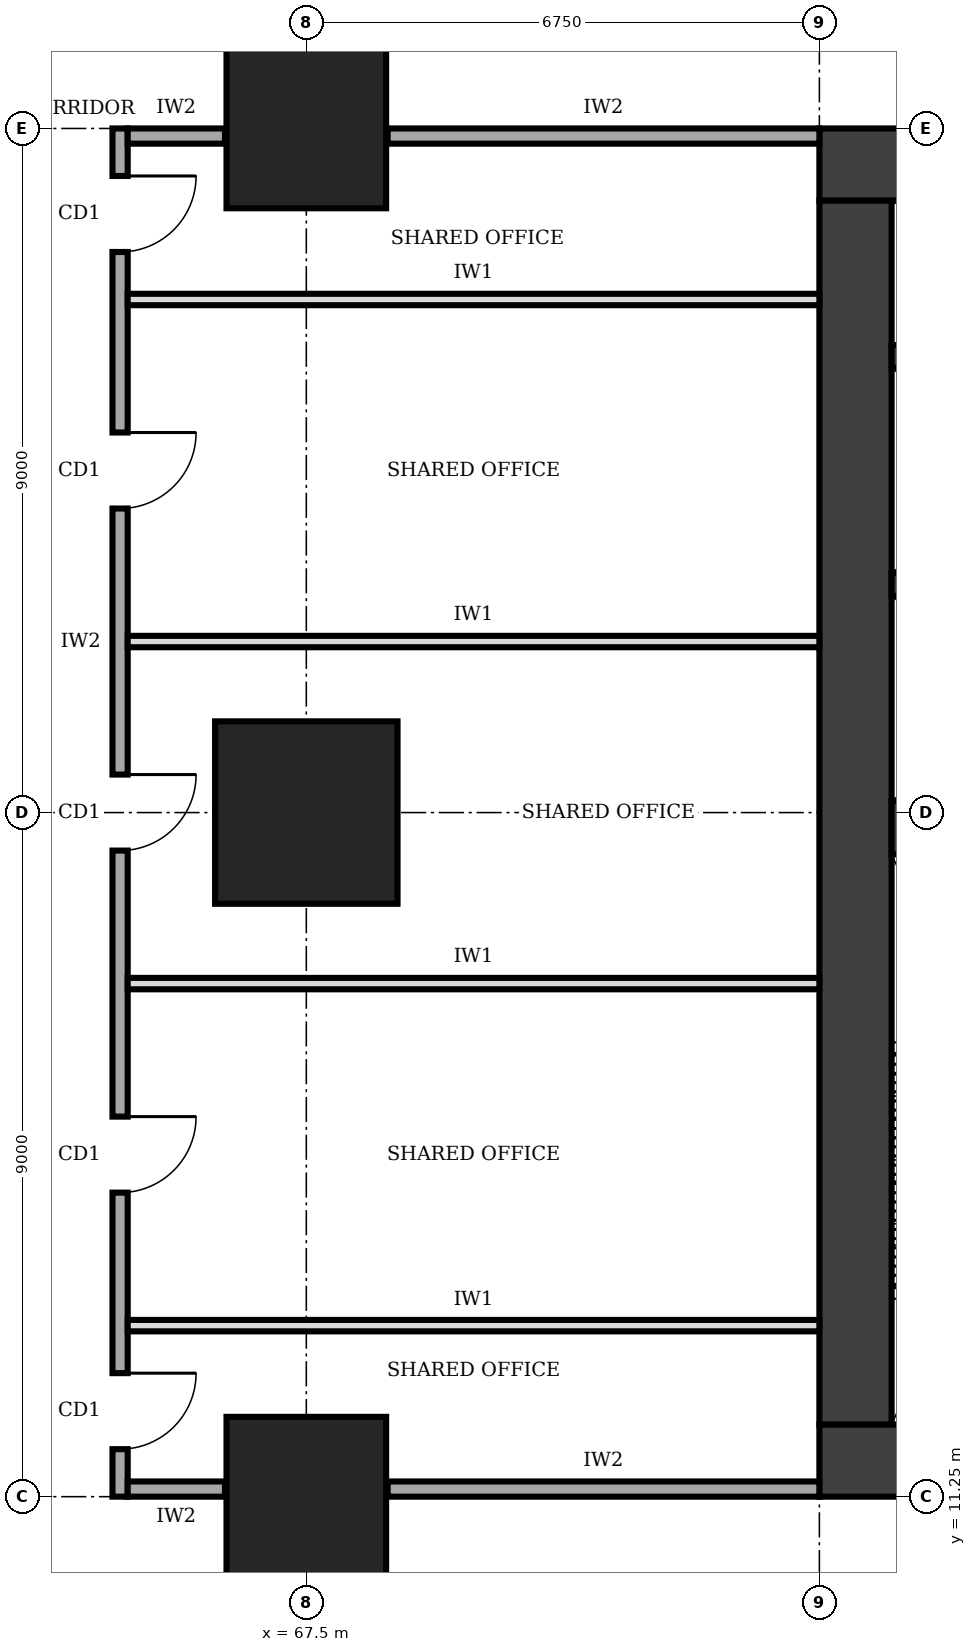
"""IFC4 building model, lengths in metres.
Left out: names, types, materials, properties, quantities, classifications, styles, units other than length and angle.
Written with IfcOpenShell. Run it as: python <this file> out.ifc"""

import sys

from ifc_helpers import new_model, si_unit, direction, frame, frame_2d, origin, origin_2d, place, context, subcontext, project, spatial, rectangle, extrude, element, fill, save


model = new_model("IFC4")
c1 = context("Model", 3, precision=1e-05, world=origin(), true_north=direction((0.0, 1.0)))
c2 = subcontext(c1, "Body", "Model", "MODEL_VIEW")
j1 = project(units=[si_unit("LENGTHUNIT", "METRE"), si_unit("PLANEANGLEUNIT", "RADIAN")], contexts=[c1])
p1 = place(None, origin())
s1 = spatial("IfcSite", under=j1, at=p1, CompositionType="ELEMENT")
p2 = place(p1, origin())
s2 = spatial("IfcBuilding", under=s1, at=p2, CompositionType="ELEMENT")
p3 = place(p2, frame((0.0, 0.0, 85.0)))
s3 = spatial("IfcBuildingStorey", under=s2, at=p3, CompositionType="ELEMENT", Elevation=85.0)
p4 = place(p3, frame((74.25, 11.725, 0.0), z_axis=(0.0, 0.0, 1.0), x_axis=(1.0, 0.0, 0.0)))
e1 = element("IfcWall", 1, at=p4, inside=s3, PredefinedType="SHEAR", context=c2, shape_type="SweptSolid", body=[
    extrude(rectangle(XDim=13.5, YDim=0.95, at=frame_2d((6.75, 0.0))), origin(), (0.0, 0.0, 1.0), 4.0),
])
p5 = place(p4, frame((4.75, 0.0, 0.0)))
e2 = element("IfcOpeningElement", 2, at=p5, cuts=e1, PredefinedType="OPENING", context=c2, shape_type="SweptSolid", body=[
    extrude(rectangle(XDim=1.0, YDim=2.1, at=frame_2d((0.5, 1.05))), frame((0.0, 0.485, 0.0), z_axis=(0.0, -1.0, 0.0), x_axis=(1.0, 0.0, 0.0)), (0.0, 0.0, 1.0), 0.97),
])
p6 = place(p3, frame((87.75, 28.775, 0.0), z_axis=(0.0, 0.0, 1.0), x_axis=(-1.0, 0.0, 0.0)))
e3 = element("IfcWall", 3, at=p6, inside=s3, PredefinedType="SHEAR", context=c2, shape_type="SweptSolid", body=[
    extrude(rectangle(XDim=13.5, YDim=0.95, at=frame_2d((6.75, 0.0))), origin(), (0.0, 0.0, 1.0), 4.0),
])
p7 = place(p6, frame((4.75, 0.0, 0.0)))
e4 = element("IfcOpeningElement", 4, at=p7, cuts=e3, PredefinedType="OPENING", context=c2, shape_type="SweptSolid", body=[
    extrude(rectangle(XDim=1.8, YDim=2.1, at=frame_2d((0.9, 1.05))), frame((0.0, 0.485, 0.0), z_axis=(0.0, -1.0, 0.0), x_axis=(1.0, 0.0, 0.0)), (0.0, 0.0, 1.0), 0.97),
])
p8 = place(p3, frame((74.725, 28.3, 0.0), z_axis=(0.0, 0.0, 1.0), x_axis=(0.0, -1.0, 0.0)))
e5 = element("IfcWall", 5, at=p8, inside=s3, PredefinedType="SHEAR", context=c2, shape_type="SweptSolid", body=[
    extrude(rectangle(XDim=16.1, YDim=0.95, at=frame_2d((8.05, 0.0))), origin(), (0.0, 0.0, 1.0), 4.0),
])
p9 = place(p3, frame((75.2, 20.05, 0.0), z_axis=(0.0, 0.0, 1.0), x_axis=(1.0, 0.0, 0.0)))
e6 = element("IfcWall", 6, at=p9, inside=s3, PredefinedType="SHEAR", context=c2, shape_type="SweptSolid", body=[
    extrude(rectangle(XDim=3.4, YDim=0.7, at=frame_2d((1.7, 0.0))), origin(), (0.0, 0.0, 1.0), 4.0),
])
for number, where, z_axis, x_axis in (
    (7, (75.2, 23.25, 0.0), (0.0, 0.0, 1.0), (1.0, 0.0, 0.0)),
    (8, (75.2, 26.25, 0.0), (0.0, 0.0, 1.0), (1.0, 0.0, 0.0)),
):
    element("IfcWall", number, at=place(p3, frame(where, z_axis=z_axis, x_axis=x_axis)), inside=s3, PredefinedType="SHEAR", context=c2, shape_type="SweptSolid", body=[
        extrude(rectangle(XDim=3.4, YDim=0.3, at=frame_2d((1.7, 0.0))), origin(), (0.0, 0.0, 1.0), 4.0),
    ])
p10 = place(p3, frame((67.5, 11.25, 0.0), z_axis=(0.0, 0.0, 1.0), x_axis=(1.0, 0.0, 0.0)))
e9 = element("IfcColumn", 9, at=p10, inside=s3, PredefinedType="COLUMN", context=c2, shape_type="SweptSolid", body=[
    extrude(rectangle(XDim=2.1, YDim=2.1, at=origin_2d()), origin(), (0.0, 0.0, 1.0), 4.0),
])
p11 = place(p3, frame((67.5, 20.25, 0.0), z_axis=(0.0, 0.0, 1.0), x_axis=(1.0, 0.0, 0.0)))
e10 = element("IfcColumn", 10, at=p11, inside=s3, PredefinedType="COLUMN", context=c2, shape_type="SweptSolid", body=[
    extrude(rectangle(XDim=2.4, YDim=2.4, at=origin_2d()), origin(), (0.0, 0.0, 1.0), 4.0),
])
p12 = place(p3, frame((67.5, 29.25, 0.0), z_axis=(0.0, 0.0, 1.0), x_axis=(1.0, 0.0, 0.0)))
e11 = element("IfcColumn", 11, at=p12, inside=s3, PredefinedType="COLUMN", context=c2, shape_type="SweptSolid", body=[
    extrude(rectangle(XDim=2.1, YDim=2.1, at=origin_2d()), origin(), (0.0, 0.0, 1.0), 4.0),
])
p13 = place(p3, frame((65.05, 29.25, 0.0), z_axis=(0.0, 0.0, 1.0), x_axis=(0.0, -1.0, 0.0)))
e12 = element("IfcWall", 12, at=p13, inside=s3, PredefinedType="SOLIDWALL", context=c2, shape_type="SweptSolid", body=[
    extrude(rectangle(XDim=18.0, YDim=0.2, at=frame_2d((9.0, 0.0))), origin(), (0.0, 0.0, 1.0), 3.75),
])
p14 = place(p13, frame((16.375, 0.0, 0.0)))
e13 = element("IfcOpeningElement", 13, at=p14, cuts=e12, PredefinedType="OPENING", context=c2, shape_type="SweptSolid", body=[
    extrude(rectangle(XDim=1.0, YDim=2.1, at=frame_2d((0.5, 1.05))), frame((0.0, 0.11, 0.0), z_axis=(0.0, -1.0, 0.0), x_axis=(1.0, 0.0, 0.0)), (0.0, 0.0, 1.0), 0.22),
])
p15 = place(p13, frame((13.0, 0.0, 0.0)))
e14 = element("IfcOpeningElement", 14, at=p15, cuts=e12, PredefinedType="OPENING", context=c2, shape_type="SweptSolid", body=[
    extrude(rectangle(XDim=1.0, YDim=2.1, at=frame_2d((0.5, 1.05))), frame((0.0, 0.11, 0.0), z_axis=(0.0, -1.0, 0.0), x_axis=(1.0, 0.0, 0.0)), (0.0, 0.0, 1.0), 0.22),
])
p16 = place(p13, frame((8.5, 0.0, 0.0)))
e15 = element("IfcOpeningElement", 15, at=p16, cuts=e12, PredefinedType="OPENING", context=c2, shape_type="SweptSolid", body=[
    extrude(rectangle(XDim=1.0, YDim=2.1, at=frame_2d((0.5, 1.05))), frame((0.0, 0.11, 0.0), z_axis=(0.0, -1.0, 0.0), x_axis=(1.0, 0.0, 0.0)), (0.0, 0.0, 1.0), 0.22),
])
p17 = place(p13, frame((4.0, 0.0, 0.0)))
e16 = element("IfcOpeningElement", 16, at=p17, cuts=e12, PredefinedType="OPENING", context=c2, shape_type="SweptSolid", body=[
    extrude(rectangle(XDim=1.0, YDim=2.1, at=frame_2d((0.5, 1.05))), frame((0.0, 0.11, 0.0), z_axis=(0.0, -1.0, 0.0), x_axis=(1.0, 0.0, 0.0)), (0.0, 0.0, 1.0), 0.22),
])
p18 = place(p13, frame((0.625, 0.0, 0.0)))
e17 = element("IfcOpeningElement", 17, at=p18, cuts=e12, PredefinedType="OPENING", context=c2, shape_type="SweptSolid", body=[
    extrude(rectangle(XDim=1.0, YDim=2.1, at=frame_2d((0.5, 1.05))), frame((0.0, 0.11, 0.0), z_axis=(0.0, -1.0, 0.0), x_axis=(1.0, 0.0, 0.0)), (0.0, 0.0, 1.0), 0.22),
])
p19 = place(p3, frame((65.15, 11.35, 0.0), z_axis=(0.0, 0.0, 1.0), x_axis=(1.0, 0.0, 0.0)))
e18 = element("IfcWall", 18, at=p19, inside=s3, PredefinedType="SOLIDWALL", context=c2, shape_type="SweptSolid", body=[
    extrude(rectangle(XDim=1.28, YDim=0.2, at=frame_2d((0.64, 0.0))), origin(), (0.0, 0.0, 1.0), 2.85),
])
p20 = place(p3, frame((68.57, 11.35, 0.0), z_axis=(0.0, 0.0, 1.0), x_axis=(1.0, 0.0, 0.0)))
e19 = element("IfcWall", 19, at=p20, inside=s3, PredefinedType="SOLIDWALL", context=c2, shape_type="SweptSolid", body=[
    extrude(rectangle(XDim=5.68, YDim=0.2, at=frame_2d((2.84, 0.0))), origin(), (0.0, 0.0, 1.0), 2.85),
])
p21 = place(p3, frame((65.15, 29.15, 0.0), z_axis=(0.0, 0.0, 1.0), x_axis=(1.0, 0.0, 0.0)))
e20 = element("IfcWall", 20, at=p21, inside=s3, PredefinedType="SOLIDWALL", context=c2, shape_type="SweptSolid", body=[
    extrude(rectangle(XDim=1.28, YDim=0.2, at=frame_2d((0.64, 0.0))), origin(), (0.0, 0.0, 1.0), 2.85),
])
p22 = place(p3, frame((68.57, 29.15, 0.0), z_axis=(0.0, 0.0, 1.0), x_axis=(1.0, 0.0, 0.0)))
e21 = element("IfcWall", 21, at=p22, inside=s3, PredefinedType="SOLIDWALL", context=c2, shape_type="SweptSolid", body=[
    extrude(rectangle(XDim=5.68, YDim=0.2, at=frame_2d((2.84, 0.0))), origin(), (0.0, 0.0, 1.0), 2.85),
])
for number, where, z_axis, x_axis in (
    (22, (65.15, 13.5, 0.0), (0.0, 0.0, 1.0), (1.0, 0.0, 0.0)),
    (23, (65.15, 18.0, 0.0), (0.0, 0.0, 1.0), (1.0, 0.0, 0.0)),
    (24, (65.15, 22.5, 0.0), (0.0, 0.0, 1.0), (1.0, 0.0, 0.0)),
    (25, (65.15, 27.0, 0.0), (0.0, 0.0, 1.0), (1.0, 0.0, 0.0)),
):
    element("IfcWall", number, at=place(p3, frame(where, z_axis=z_axis, x_axis=x_axis)), inside=s3, PredefinedType="PARTITIONING", context=c2, shape_type="SweptSolid", body=[
        extrude(rectangle(XDim=9.1, YDim=0.15, at=frame_2d((4.55, 0.0))), origin(), (0.0, 0.0, 1.0), 3.75),
    ])
p23 = place(p14, origin())
e26 = element("IfcDoor", 26, at=p23, inside=s3, OperationType="SINGLE_SWING_LEFT", PredefinedType="DOOR", context=c2, shape_type="SweptSolid", body=[
    extrude(rectangle(XDim=1.0, YDim=2.1, at=frame_2d((0.5, 1.05))), frame((0.0, 0.025, 0.0), z_axis=(0.0, -1.0, 0.0), x_axis=(1.0, 0.0, 0.0)), (0.0, 0.0, 1.0), 0.05),
])
fill(e13, e26)
p24 = place(p15, origin())
e27 = element("IfcDoor", 27, at=p24, inside=s3, OperationType="SINGLE_SWING_LEFT", PredefinedType="DOOR", context=c2, shape_type="SweptSolid", body=[
    extrude(rectangle(XDim=1.0, YDim=2.1, at=frame_2d((0.5, 1.05))), frame((0.0, 0.025, 0.0), z_axis=(0.0, -1.0, 0.0), x_axis=(1.0, 0.0, 0.0)), (0.0, 0.0, 1.0), 0.05),
])
fill(e14, e27)
p25 = place(p16, origin())
e28 = element("IfcDoor", 28, at=p25, inside=s3, OperationType="SINGLE_SWING_LEFT", PredefinedType="DOOR", context=c2, shape_type="SweptSolid", body=[
    extrude(rectangle(XDim=1.0, YDim=2.1, at=frame_2d((0.5, 1.05))), frame((0.0, 0.025, 0.0), z_axis=(0.0, -1.0, 0.0), x_axis=(1.0, 0.0, 0.0)), (0.0, 0.0, 1.0), 0.05),
])
fill(e15, e28)
p26 = place(p17, origin())
e29 = element("IfcDoor", 29, at=p26, inside=s3, OperationType="SINGLE_SWING_LEFT", PredefinedType="DOOR", context=c2, shape_type="SweptSolid", body=[
    extrude(rectangle(XDim=1.0, YDim=2.1, at=frame_2d((0.5, 1.05))), frame((0.0, 0.025, 0.0), z_axis=(0.0, -1.0, 0.0), x_axis=(1.0, 0.0, 0.0)), (0.0, 0.0, 1.0), 0.05),
])
fill(e16, e29)
p27 = place(p18, origin())
e30 = element("IfcDoor", 30, at=p27, inside=s3, OperationType="SINGLE_SWING_LEFT", PredefinedType="DOOR", context=c2, shape_type="SweptSolid", body=[
    extrude(rectangle(XDim=1.0, YDim=2.1, at=frame_2d((0.5, 1.05))), frame((0.0, 0.025, 0.0), z_axis=(0.0, -1.0, 0.0), x_axis=(1.0, 0.0, 0.0)), (0.0, 0.0, 1.0), 0.05),
])
fill(e17, e30)
save(model, sys.argv[1])
